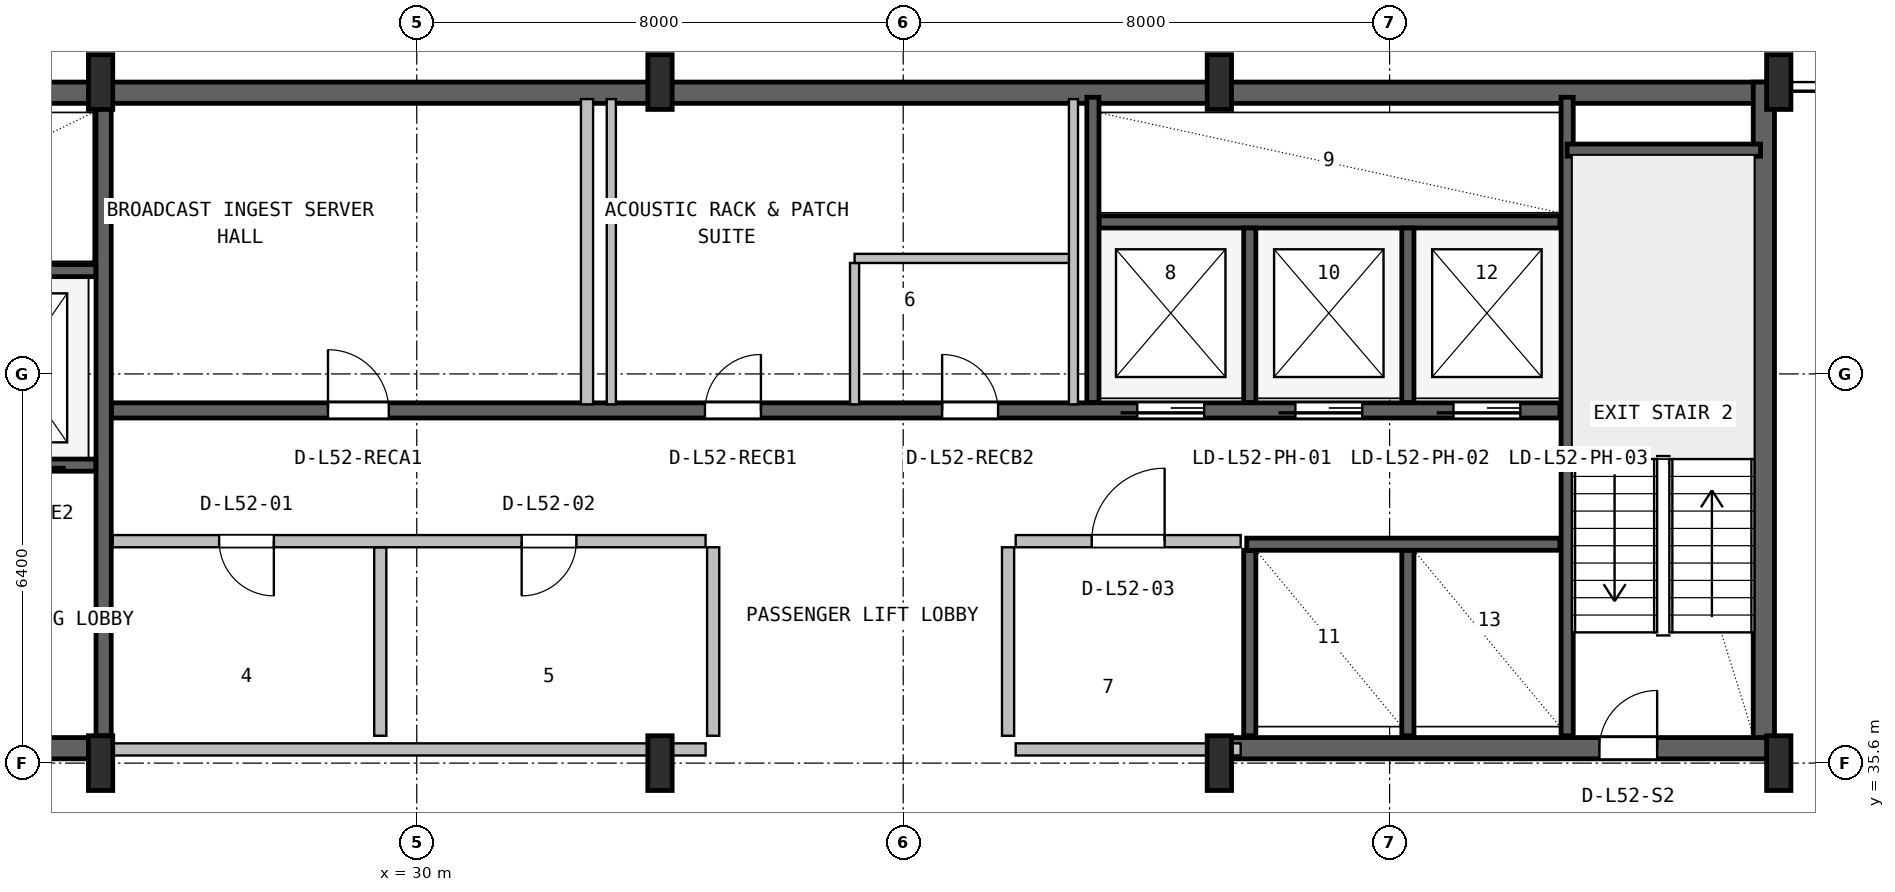
"""IFC4 building model, lengths in metres.
Left out: names, types, materials, properties, quantities, classifications, styles, units other than length and angle.
Written with IfcOpenShell. Run it as: python <this file> out.ifc"""

import sys

from ifc_helpers import new_model, si_unit, direction, frame, frame_2d, origin, origin_2d, place, context, subcontext, project, spatial, rectangle, i_section, extrude, source, transform, mapped, element, fill, save


model = new_model("IFC4")
c1 = context("Model", 3, precision=1e-05, world=origin(), true_north=direction((0.0, 1.0)))
c2 = subcontext(c1, "Body", "Model", "MODEL_VIEW")
j1 = project(units=[si_unit("LENGTHUNIT", "METRE"), si_unit("PLANEANGLEUNIT", "RADIAN")], contexts=[c1])
p1 = place(None, origin())
s1 = spatial("IfcSite", under=j1, at=p1, CompositionType="ELEMENT")
p2 = place(p1, origin())
s2 = spatial("IfcBuilding", under=s1, at=p2, CompositionType="ELEMENT")
p3 = place(p2, frame((0.0, 0.0, 211.2)))
s3 = spatial("IfcBuildingStorey", under=s2, at=p3, CompositionType="ELEMENT", Elevation=211.2)
p4 = place(p3, frame((15.6, 46.625, 0.0), z_axis=(0.0, 0.0, 1.0), x_axis=(1.0, 0.0, 0.0)))
e1 = element("IfcWall", 1, at=p4, inside=s3, PredefinedType="SHEAR", context=c2, shape_type="SweptSolid", body=[
    extrude(rectangle(XDim=36.8, YDim=0.35, at=frame_2d((18.4, 0.0))), origin(), (0.0, 0.0, 1.0), 3.55),
])
p5 = place(p3, frame((52.155, 35.67, 0.0), z_axis=(0.0, 0.0, 1.0), x_axis=(0.0, 1.0, 0.0)))
e2 = element("IfcWall", 2, at=p5, inside=s3, PredefinedType="SHEAR", context=c2, shape_type="SweptSolid", body=[
    extrude(rectangle(XDim=11.13, YDim=0.35, at=frame_2d((5.565, 0.0))), origin(), (0.0, 0.0, 1.0), 3.55),
])
p6 = place(p3, frame((15.67, 35.845, 0.0), z_axis=(0.0, 0.0, 1.0), x_axis=(1.0, 0.0, 0.0)))
e3 = element("IfcWall", 3, at=p6, inside=s3, PredefinedType="SHEAR", context=c2, shape_type="SweptSolid", body=[
    extrude(rectangle(XDim=9.13, YDim=0.35, at=frame_2d((4.565, 0.0))), origin(), (0.0, 0.0, 1.0), 3.55),
])
p7 = place(p6, frame((5.4, 0.0, 0.0)))
e4 = element("IfcOpeningElement", 4, at=p7, cuts=e3, PredefinedType="OPENING", context=c2, shape_type="SweptSolid", body=[
    extrude(rectangle(XDim=1.0, YDim=2.1, at=frame_2d((0.5, 1.05))), frame((0.0, 0.185, 0.0), z_axis=(0.0, -1.0, 0.0), x_axis=(1.0, 0.0, 0.0)), (0.0, 0.0, 1.0), 0.37),
])
p8 = place(p3, frame((43.2, 35.845, 0.0), z_axis=(0.0, 0.0, 1.0), x_axis=(1.0, 0.0, 0.0)))
e5 = element("IfcWall", 5, at=p8, inside=s3, PredefinedType="SHEAR", context=c2, shape_type="SweptSolid", body=[
    extrude(rectangle(XDim=9.13, YDim=0.35, at=frame_2d((4.565, 0.0))), origin(), (0.0, 0.0, 1.0), 3.55),
])
p9 = place(p8, frame((6.25, 0.0, 0.0)))
e6 = element("IfcOpeningElement", 6, at=p9, cuts=e5, PredefinedType="OPENING", context=c2, shape_type="SweptSolid", body=[
    extrude(rectangle(XDim=0.95, YDim=2.1, at=frame_2d((0.475, 1.05))), frame((0.0, 0.185, 0.0), z_axis=(0.0, -1.0, 0.0), x_axis=(1.0, 0.0, 0.0)), (0.0, 0.0, 1.0), 0.37),
])
m1 = source(origin(), c2, "Body", "SweptSolid", [
    extrude(i_section(OverallWidth=0.4, OverallDepth=0.9, WebThickness=0.016, FlangeThickness=0.028, FilletRadius=0.016, at=origin_2d()), origin(), (0.0, 0.0, 1.0), 3.8),
])
for number, where, z_axis, x_axis in (
    (7, (24.8, 35.6, 0.0), (0.0, 0.0, 1.0), (1.0, 0.0, 0.0)),
    (8, (24.8, 46.8, 0.0), (0.0, 0.0, 1.0), (1.0, 0.0, 0.0)),
    (9, (34.0, 35.6, 0.0), (0.0, 0.0, 1.0), (1.0, 0.0, 0.0)),
    (10, (34.0, 46.8, 0.0), (0.0, 0.0, 1.0), (1.0, 0.0, 0.0)),
    (11, (43.2, 35.6, 0.0), (0.0, 0.0, 1.0), (1.0, 0.0, 0.0)),
    (12, (43.2, 46.8, 0.0), (0.0, 0.0, 1.0), (1.0, 0.0, 0.0)),
    (13, (52.4, 35.6, 0.0), (0.0, 0.0, 1.0), (1.0, 0.0, 0.0)),
    (14, (52.4, 46.8, 0.0), (0.0, 0.0, 1.0), (1.0, 0.0, 0.0)),
):
    element("IfcColumn", number, at=place(p3, frame(where, z_axis=z_axis, x_axis=x_axis)), inside=s3, PredefinedType="COLUMN", context=c2, shape_type="MappedRepresentation", body=[
        mapped(m1, transform((0.0, 0.0, 0.0), x_axis=(1.0, 0.0, 0.0), y_axis=(0.0, 1.0, 0.0), z_axis=(0.0, 0.0, 1.0), scale=1.0)),
    ])
p10 = place(p3, frame((24.85, 36.05, 0.0), z_axis=(0.0, 0.0, 1.0), x_axis=(0.0, 1.0, 0.0)))
e15 = element("IfcWall", 15, at=p10, inside=s3, PredefinedType="SHEAR", context=c2, shape_type="SweptSolid", body=[
    extrude(rectangle(XDim=10.45, YDim=0.25, at=frame_2d((5.225, 0.0))), origin(), (0.0, 0.0, 1.0), 3.55),
])
p11 = place(p3, frame((19.2, 40.5, 0.0), z_axis=(0.0, 0.0, 1.0), x_axis=(1.0, 0.0, 0.0)))
e16 = element("IfcWall", 16, at=p11, inside=s3, PredefinedType="SHEAR", context=c2, shape_type="SweptSolid", body=[
    extrude(rectangle(XDim=5.52, YDim=0.2, at=frame_2d((2.76, 0.0))), origin(), (0.0, 0.0, 1.0), 3.55),
])
p12 = place(p11, frame((1.05, 0.0, 0.0)))
e17 = element("IfcOpeningElement", 17, at=p12, cuts=e16, PredefinedType="OPENING", context=c2, shape_type="SweptSolid", body=[
    extrude(rectangle(XDim=1.1, YDim=2.18, at=frame_2d((0.55, 1.09))), frame((0.0, 0.11, 0.0), z_axis=(0.0, -1.0, 0.0), x_axis=(1.0, 0.0, 0.0)), (0.0, 0.0, 1.0), 0.22),
])
p13 = place(p11, frame((3.65, 0.0, 0.0)))
e18 = element("IfcOpeningElement", 18, at=p13, cuts=e16, PredefinedType="OPENING", context=c2, shape_type="SweptSolid", body=[
    extrude(rectangle(XDim=1.1, YDim=2.18, at=frame_2d((0.55, 1.09))), frame((0.0, 0.11, 0.0), z_axis=(0.0, -1.0, 0.0), x_axis=(1.0, 0.0, 0.0)), (0.0, 0.0, 1.0), 0.22),
])
p14 = place(p3, frame((19.2, 43.7, 0.0), z_axis=(0.0, 0.0, 1.0), x_axis=(1.0, 0.0, 0.0)))
e19 = element("IfcWall", 19, at=p14, inside=s3, PredefinedType="SHEAR", context=c2, shape_type="SweptSolid", body=[
    extrude(rectangle(XDim=5.52, YDim=0.2, at=frame_2d((2.76, 0.0))), origin(), (0.0, 0.0, 1.0), 3.55),
])
p15 = place(p3, frame((48.92, 36.05, 0.0), z_axis=(0.0, 0.0, 1.0), x_axis=(0.0, 1.0, 0.0)))
e20 = element("IfcWall", 20, at=p15, inside=s3, PredefinedType="SHEAR", context=c2, shape_type="SweptSolid", body=[
    extrude(rectangle(XDim=10.5, YDim=0.2, at=frame_2d((5.25, 0.0))), origin(), (0.0, 0.0, 1.0), 3.55),
])
p16 = place(p3, frame((48.92, 45.68, 0.0), z_axis=(0.0, 0.0, 1.0), x_axis=(1.0, 0.0, 0.0)))
e21 = element("IfcWall", 21, at=p16, inside=s3, PredefinedType="SHEAR", context=c2, shape_type="SweptSolid", body=[
    extrude(rectangle(XDim=3.18, YDim=0.2, at=frame_2d((1.59, 0.0))), origin(), (0.0, 0.0, 1.0), 3.55),
])
p17 = place(p3, frame((24.98, 41.4, 0.0), z_axis=(0.0, 0.0, 1.0), x_axis=(1.0, 0.0, 0.0)))
e22 = element("IfcWall", 22, at=p17, inside=s3, PredefinedType="SHEAR", context=c2, shape_type="SweptSolid", body=[
    extrude(rectangle(XDim=23.82, YDim=0.25, at=frame_2d((11.91, 0.0))), origin(), (0.0, 0.0, 1.0), 3.55),
])
p18 = place(p17, frame((16.87, 0.0, 0.0)))
e23 = element("IfcOpeningElement", 23, at=p18, cuts=e22, PredefinedType="OPENING", context=c2, shape_type="SweptSolid", body=[
    extrude(rectangle(XDim=1.1, YDim=2.18, at=frame_2d((0.55, 1.09))), frame((0.0, 0.135, 0.0), z_axis=(0.0, -1.0, 0.0), x_axis=(1.0, 0.0, 0.0)), (0.0, 0.0, 1.0), 0.27),
])
p19 = place(p17, frame((19.47, 0.0, 0.0)))
e24 = element("IfcOpeningElement", 24, at=p19, cuts=e22, PredefinedType="OPENING", context=c2, shape_type="SweptSolid", body=[
    extrude(rectangle(XDim=1.1, YDim=2.18, at=frame_2d((0.55, 1.09))), frame((0.0, 0.135, 0.0), z_axis=(0.0, -1.0, 0.0), x_axis=(1.0, 0.0, 0.0)), (0.0, 0.0, 1.0), 0.27),
])
p20 = place(p17, frame((22.07, 0.0, 0.0)))
e25 = element("IfcOpeningElement", 25, at=p20, cuts=e22, PredefinedType="OPENING", context=c2, shape_type="SweptSolid", body=[
    extrude(rectangle(XDim=1.1, YDim=2.18, at=frame_2d((0.55, 1.09))), frame((0.0, 0.135, 0.0), z_axis=(0.0, -1.0, 0.0), x_axis=(1.0, 0.0, 0.0)), (0.0, 0.0, 1.0), 0.27),
])
p21 = place(p17, frame((3.56, 0.0, 0.0)))
e26 = element("IfcOpeningElement", 26, at=p21, cuts=e22, PredefinedType="OPENING", context=c2, shape_type="SweptSolid", body=[
    extrude(rectangle(XDim=1.0, YDim=2.08, at=frame_2d((0.5, 1.04))), frame((0.0, 0.135, 0.0), z_axis=(0.0, -1.0, 0.0), x_axis=(1.0, 0.0, 0.0)), (0.0, 0.0, 1.0), 0.27),
])
p22 = place(p17, frame((9.76, 0.0, 0.0)))
e27 = element("IfcOpeningElement", 27, at=p22, cuts=e22, PredefinedType="OPENING", context=c2, shape_type="SweptSolid", body=[
    extrude(rectangle(XDim=0.92, YDim=2.08, at=frame_2d((0.46, 1.04))), frame((0.0, 0.135, 0.0), z_axis=(0.0, -1.0, 0.0), x_axis=(1.0, 0.0, 0.0)), (0.0, 0.0, 1.0), 0.27),
])
p23 = place(p17, frame((13.66, 0.0, 0.0)))
e28 = element("IfcOpeningElement", 28, at=p23, cuts=e22, PredefinedType="OPENING", context=c2, shape_type="SweptSolid", body=[
    extrude(rectangle(XDim=0.92, YDim=2.08, at=frame_2d((0.46, 1.04))), frame((0.0, 0.135, 0.0), z_axis=(0.0, -1.0, 0.0), x_axis=(1.0, 0.0, 0.0)), (0.0, 0.0, 1.0), 0.27),
])
p24 = place(p3, frame((41.22, 44.5, 0.0), z_axis=(0.0, 0.0, 1.0), x_axis=(1.0, 0.0, 0.0)))
e29 = element("IfcWall", 29, at=p24, inside=s3, PredefinedType="SHEAR", context=c2, shape_type="SweptSolid", body=[
    extrude(rectangle(XDim=7.58, YDim=0.2, at=frame_2d((3.79, 0.0))), origin(), (0.0, 0.0, 1.0), 3.55),
])
p25 = place(p3, frame((41.12, 41.53, 0.0), z_axis=(0.0, 0.0, 1.0), x_axis=(0.0, 1.0, 0.0)))
e30 = element("IfcWall", 30, at=p25, inside=s3, PredefinedType="SHEAR", context=c2, shape_type="SweptSolid", body=[
    extrude(rectangle(XDim=5.02, YDim=0.2, at=frame_2d((2.51, 0.0))), origin(), (0.0, 0.0, 1.0), 3.55),
])
for number, where, z_axis, x_axis in (
    (31, (43.7, 41.53, 0.0), (0.0, 0.0, 1.0), (0.0, 1.0, 0.0)),
    (32, (46.3, 41.53, 0.0), (0.0, 0.0, 1.0), (0.0, 1.0, 0.0)),
):
    element("IfcWall", number, at=place(p3, frame(where, z_axis=z_axis, x_axis=x_axis)), inside=s3, PredefinedType="SHEAR", context=c2, shape_type="SweptSolid", body=[
        extrude(rectangle(XDim=2.87, YDim=0.2, at=frame_2d((1.435, 0.0))), origin(), (0.0, 0.0, 1.0), 3.55),
    ])
for number, where, z_axis, x_axis in (
    (33, (43.7, 36.05, 0.0), (0.0, 0.0, 1.0), (0.0, 1.0, 0.0)),
    (34, (46.3, 36.05, 0.0), (0.0, 0.0, 1.0), (0.0, 1.0, 0.0)),
):
    element("IfcWall", number, at=place(p3, frame(where, z_axis=z_axis, x_axis=x_axis)), inside=s3, PredefinedType="SHEAR", context=c2, shape_type="SweptSolid", body=[
        extrude(rectangle(XDim=3.05, YDim=0.2, at=frame_2d((1.525, 0.0))), origin(), (0.0, 0.0, 1.0), 3.55),
    ])
p26 = place(p3, frame((43.65, 39.2, 0.0), z_axis=(0.0, 0.0, 1.0), x_axis=(1.0, 0.0, 0.0)))
e35 = element("IfcWall", 35, at=p26, inside=s3, PredefinedType="SHEAR", context=c2, shape_type="SweptSolid", body=[
    extrude(rectangle(XDim=5.15, YDim=0.2, at=frame_2d((2.575, 0.0))), origin(), (0.0, 0.0, 1.0), 3.55),
])
p27 = place(p3, frame((25.0, 35.825, 0.0), z_axis=(0.0, 0.0, 1.0), x_axis=(1.0, 0.0, 0.0)))
e36 = element("IfcWall", 36, at=p27, inside=s3, PredefinedType="PLUMBINGWALL", context=c2, shape_type="SweptSolid", body=[
    extrude(rectangle(XDim=9.75, YDim=0.2, at=frame_2d((4.875, 0.0))), origin(), (0.0, 0.0, 1.0), 2.575),
])
p28 = place(p3, frame((29.4, 36.05, 0.0), z_axis=(0.0, 0.0, 1.0), x_axis=(0.0, 1.0, 0.0)))
e37 = element("IfcWall", 37, at=p28, inside=s3, PredefinedType="PLUMBINGWALL", context=c2, shape_type="SweptSolid", body=[
    extrude(rectangle(XDim=3.1, YDim=0.2, at=frame_2d((1.55, 0.0))), origin(), (0.0, 0.0, 1.0), 3.53),
])
p29 = place(p3, frame((25.0, 39.25, 0.0), z_axis=(0.0, 0.0, 1.0), x_axis=(1.0, 0.0, 0.0)))
e38 = element("IfcWall", 38, at=p29, inside=s3, PredefinedType="PLUMBINGWALL", context=c2, shape_type="SweptSolid", body=[
    extrude(rectangle(XDim=9.75, YDim=0.2, at=frame_2d((4.875, 0.0))), origin(), (0.0, 0.0, 1.0), 3.53),
])
p30 = place(p29, frame((1.75, 0.0, 0.0)))
e39 = element("IfcOpeningElement", 39, at=p30, cuts=e38, PredefinedType="OPENING", context=c2, shape_type="SweptSolid", body=[
    extrude(rectangle(XDim=0.9, YDim=2.06, at=frame_2d((0.45, 1.03))), frame((0.0, 0.11, 0.0), z_axis=(0.0, -1.0, 0.0), x_axis=(1.0, 0.0, 0.0)), (0.0, 0.0, 1.0), 0.22),
])
p31 = place(p29, frame((6.725, 0.0, 0.0)))
e40 = element("IfcOpeningElement", 40, at=p31, cuts=e38, PredefinedType="OPENING", context=c2, shape_type="SweptSolid", body=[
    extrude(rectangle(XDim=0.9, YDim=2.06, at=frame_2d((0.45, 1.03))), frame((0.0, 0.11, 0.0), z_axis=(0.0, -1.0, 0.0), x_axis=(1.0, 0.0, 0.0)), (0.0, 0.0, 1.0), 0.22),
])
p32 = place(p3, frame((34.875, 36.05, 0.0), z_axis=(0.0, 0.0, 1.0), x_axis=(0.0, 1.0, 0.0)))
e41 = element("IfcWall", 41, at=p32, inside=s3, PredefinedType="PLUMBINGWALL", context=c2, shape_type="SweptSolid", body=[
    extrude(rectangle(XDim=3.1, YDim=0.2, at=frame_2d((1.55, 0.0))), origin(), (0.0, 0.0, 1.0), 3.53),
])
p33 = place(p3, frame((39.85, 35.825, 0.0), z_axis=(0.0, 0.0, 1.0), x_axis=(1.0, 0.0, 0.0)))
e42 = element("IfcWall", 42, at=p33, inside=s3, PredefinedType="SOLIDWALL", context=c2, shape_type="SweptSolid", body=[
    extrude(rectangle(XDim=3.7, YDim=0.2, at=frame_2d((1.85, 0.0))), origin(), (0.0, 0.0, 1.0), 2.575),
])
p34 = place(p3, frame((39.85, 39.25, 0.0), z_axis=(0.0, 0.0, 1.0), x_axis=(1.0, 0.0, 0.0)))
e43 = element("IfcWall", 43, at=p34, inside=s3, PredefinedType="SOLIDWALL", context=c2, shape_type="SweptSolid", body=[
    extrude(rectangle(XDim=3.7, YDim=0.2, at=frame_2d((1.85, 0.0))), origin(), (0.0, 0.0, 1.0), 3.53),
])
p35 = place(p34, frame((1.25, 0.0, 0.0)))
e44 = element("IfcOpeningElement", 44, at=p35, cuts=e43, PredefinedType="OPENING", context=c2, shape_type="SweptSolid", body=[
    extrude(rectangle(XDim=1.2, YDim=2.1, at=frame_2d((0.6, 1.05))), frame((0.0, 0.11, 0.0), z_axis=(0.0, -1.0, 0.0), x_axis=(1.0, 0.0, 0.0)), (0.0, 0.0, 1.0), 0.22),
])
p36 = place(p3, frame((39.725, 36.05, 0.0), z_axis=(0.0, 0.0, 1.0), x_axis=(0.0, 1.0, 0.0)))
e45 = element("IfcWall", 45, at=p36, inside=s3, PredefinedType="SOLIDWALL", context=c2, shape_type="SweptSolid", body=[
    extrude(rectangle(XDim=3.1, YDim=0.2, at=frame_2d((1.55, 0.0))), origin(), (0.0, 0.0, 1.0), 3.53),
])
p37 = place(p3, frame((32.8, 41.5, 0.0), z_axis=(0.0, 0.0, 1.0), x_axis=(0.0, 1.0, 0.0)))
e46 = element("IfcWall", 46, at=p37, inside=s3, PredefinedType="SOLIDWALL", context=c2, shape_type="SweptSolid", body=[
    extrude(rectangle(XDim=5.02, YDim=0.2, at=frame_2d((2.51, 0.0))), origin(), (0.0, 0.0, 1.0), 3.53),
])
p38 = place(p3, frame((37.2, 41.5, 0.0), z_axis=(0.0, 0.0, 1.0), x_axis=(0.0, 1.0, 0.0)))
e47 = element("IfcWall", 47, at=p38, inside=s3, PredefinedType="PARTITIONING", context=c2, shape_type="SweptSolid", body=[
    extrude(rectangle(XDim=2.325, YDim=0.15, at=frame_2d((1.163, 0.0))), origin(), (0.0, 0.0, 1.0), 3.53),
])
p39 = place(p3, frame((37.2, 43.9, 0.0), z_axis=(0.0, 0.0, 1.0), x_axis=(1.0, 0.0, 0.0)))
e48 = element("IfcWall", 48, at=p39, inside=s3, PredefinedType="PARTITIONING", context=c2, shape_type="SweptSolid", body=[
    extrude(rectangle(XDim=3.6, YDim=0.15, at=frame_2d((1.8, 0.0))), origin(), (0.0, 0.0, 1.0), 3.53),
])
for number, where, z_axis, x_axis in (
    (49, (40.8, 41.5, 0.0), (0.0, 0.0, 1.0), (0.0, 1.0, 0.0)),
    (50, (33.2, 41.5, 0.0), (0.0, 0.0, 1.0), (0.0, 1.0, 0.0)),
):
    element("IfcWall", number, at=place(p3, frame(where, z_axis=z_axis, x_axis=x_axis)), inside=s3, PredefinedType="PARTITIONING", context=c2, shape_type="SweptSolid", body=[
        extrude(rectangle(XDim=5.02, YDim=0.15, at=frame_2d((2.51, 0.0))), origin(), (0.0, 0.0, 1.0), 3.53),
    ])
m2 = source(origin(), c2, "Body", "SweptSolid", [
    extrude(rectangle(XDim=0.95, YDim=2.1, at=frame_2d((0.475, 1.05))), frame((0.0, 0.025, 0.0), z_axis=(0.0, -1.0, 0.0), x_axis=(1.0, 0.0, 0.0)), (0.0, 0.0, 1.0), 0.05),
])
p40 = place(p9, origin())
e51 = element("IfcDoor", 51, at=p40, inside=s3, OperationType="SINGLE_SWING_RIGHT", PredefinedType="DOOR", context=c2, shape_type="MappedRepresentation", body=[
    mapped(m2, transform((0.0, 0.0, 0.0), x_axis=(1.0, 0.0, 0.0), y_axis=(0.0, 1.0, 0.0), z_axis=(0.0, 0.0, 1.0), scale=1.0)),
])
fill(e6, e51)
m3 = source(origin(), c2, "Body", "SweptSolid", [
    extrude(rectangle(XDim=1.1, YDim=2.18, at=frame_2d((0.55, 1.09))), frame((0.0, 0.025, 0.0), z_axis=(0.0, -1.0, 0.0), x_axis=(1.0, 0.0, 0.0)), (0.0, 0.0, 1.0), 0.05),
])
p41 = place(p18, frame((1.1, 0.0, 0.0), z_axis=(0.0, 0.0, 1.0), x_axis=(-1.0, 0.0, 0.0)))
e52 = element("IfcDoor", 52, at=p41, inside=s3, OperationType="SLIDING_TO_LEFT", PredefinedType="DOOR", context=c2, shape_type="MappedRepresentation", body=[
    mapped(m3, transform((0.0, 0.0, 0.0), x_axis=(1.0, 0.0, 0.0), y_axis=(0.0, 1.0, 0.0), z_axis=(0.0, 0.0, 1.0), scale=1.0)),
])
fill(e23, e52)
p42 = place(p19, frame((1.1, 0.0, 0.0), z_axis=(0.0, 0.0, 1.0), x_axis=(-1.0, 0.0, 0.0)))
e53 = element("IfcDoor", 53, at=p42, inside=s3, OperationType="SLIDING_TO_LEFT", PredefinedType="DOOR", context=c2, shape_type="MappedRepresentation", body=[
    mapped(m3, transform((0.0, 0.0, 0.0), x_axis=(1.0, 0.0, 0.0), y_axis=(0.0, 1.0, 0.0), z_axis=(0.0, 0.0, 1.0), scale=1.0)),
])
fill(e24, e53)
p43 = place(p20, frame((1.1, 0.0, 0.0), z_axis=(0.0, 0.0, 1.0), x_axis=(-1.0, 0.0, 0.0)))
e54 = element("IfcDoor", 54, at=p43, inside=s3, OperationType="SLIDING_TO_LEFT", PredefinedType="DOOR", context=c2, shape_type="MappedRepresentation", body=[
    mapped(m3, transform((0.0, 0.0, 0.0), x_axis=(1.0, 0.0, 0.0), y_axis=(0.0, 1.0, 0.0), z_axis=(0.0, 0.0, 1.0), scale=1.0)),
])
fill(e25, e54)
m4 = source(origin(), c2, "Body", "SweptSolid", [
    extrude(rectangle(XDim=1.0, YDim=2.08, at=frame_2d((0.5, 1.04))), frame((0.0, 0.025, 0.0), z_axis=(0.0, -1.0, 0.0), x_axis=(1.0, 0.0, 0.0)), (0.0, 0.0, 1.0), 0.05),
])
p44 = place(p21, origin())
e55 = element("IfcDoor", 55, at=p44, inside=s3, OperationType="SINGLE_SWING_LEFT", PredefinedType="DOOR", context=c2, shape_type="MappedRepresentation", body=[
    mapped(m4, transform((0.0, 0.0, 0.0), x_axis=(1.0, 0.0, 0.0), y_axis=(0.0, 1.0, 0.0), z_axis=(0.0, 0.0, 1.0), scale=1.0)),
])
fill(e26, e55)
m5 = source(origin(), c2, "Body", "SweptSolid", [
    extrude(rectangle(XDim=0.92, YDim=2.08, at=frame_2d((0.46, 1.04))), frame((0.0, 0.025, 0.0), z_axis=(0.0, -1.0, 0.0), x_axis=(1.0, 0.0, 0.0)), (0.0, 0.0, 1.0), 0.05),
])
p45 = place(p22, origin())
e56 = element("IfcDoor", 56, at=p45, inside=s3, OperationType="SINGLE_SWING_RIGHT", PredefinedType="DOOR", context=c2, shape_type="MappedRepresentation", body=[
    mapped(m5, transform((0.0, 0.0, 0.0), x_axis=(1.0, 0.0, 0.0), y_axis=(0.0, 1.0, 0.0), z_axis=(0.0, 0.0, 1.0), scale=1.0)),
])
fill(e27, e56)
p46 = place(p23, origin())
e57 = element("IfcDoor", 57, at=p46, inside=s3, OperationType="SINGLE_SWING_LEFT", PredefinedType="DOOR", context=c2, shape_type="MappedRepresentation", body=[
    mapped(m5, transform((0.0, 0.0, 0.0), x_axis=(1.0, 0.0, 0.0), y_axis=(0.0, 1.0, 0.0), z_axis=(0.0, 0.0, 1.0), scale=1.0)),
])
fill(e28, e57)
m6 = source(origin(), c2, "Body", "SweptSolid", [
    extrude(rectangle(XDim=0.9, YDim=2.06, at=frame_2d((0.45, 1.03))), frame((0.0, 0.025, 0.0), z_axis=(0.0, -1.0, 0.0), x_axis=(1.0, 0.0, 0.0)), (0.0, 0.0, 1.0), 0.05),
])
p47 = place(p30, frame((0.9, 0.0, 0.0), z_axis=(0.0, 0.0, 1.0), x_axis=(-1.0, 0.0, 0.0)))
e58 = element("IfcDoor", 58, at=p47, inside=s3, OperationType="SINGLE_SWING_RIGHT", PredefinedType="DOOR", context=c2, shape_type="MappedRepresentation", body=[
    mapped(m6, transform((0.0, 0.0, 0.0), x_axis=(1.0, 0.0, 0.0), y_axis=(0.0, 1.0, 0.0), z_axis=(0.0, 0.0, 1.0), scale=1.0)),
])
fill(e39, e58)
p48 = place(p31, frame((0.9, 0.0, 0.0), z_axis=(0.0, 0.0, 1.0), x_axis=(-1.0, 0.0, 0.0)))
e59 = element("IfcDoor", 59, at=p48, inside=s3, OperationType="SINGLE_SWING_LEFT", PredefinedType="DOOR", context=c2, shape_type="MappedRepresentation", body=[
    mapped(m6, transform((0.0, 0.0, 0.0), x_axis=(1.0, 0.0, 0.0), y_axis=(0.0, 1.0, 0.0), z_axis=(0.0, 0.0, 1.0), scale=1.0)),
])
fill(e40, e59)
m7 = source(origin(), c2, "Body", "SweptSolid", [
    extrude(rectangle(XDim=1.2, YDim=2.1, at=frame_2d((0.6, 1.05))), frame((0.0, 0.025, 0.0), z_axis=(0.0, -1.0, 0.0), x_axis=(1.0, 0.0, 0.0)), (0.0, 0.0, 1.0), 0.05),
])
p49 = place(p35, origin())
e60 = element("IfcDoor", 60, at=p49, inside=s3, OperationType="SINGLE_SWING_RIGHT", PredefinedType="DOOR", context=c2, shape_type="MappedRepresentation", body=[
    mapped(m7, transform((0.0, 0.0, 0.0), x_axis=(1.0, 0.0, 0.0), y_axis=(0.0, 1.0, 0.0), z_axis=(0.0, 0.0, 1.0), scale=1.0)),
])
fill(e44, e60)
save(model, sys.argv[1])
